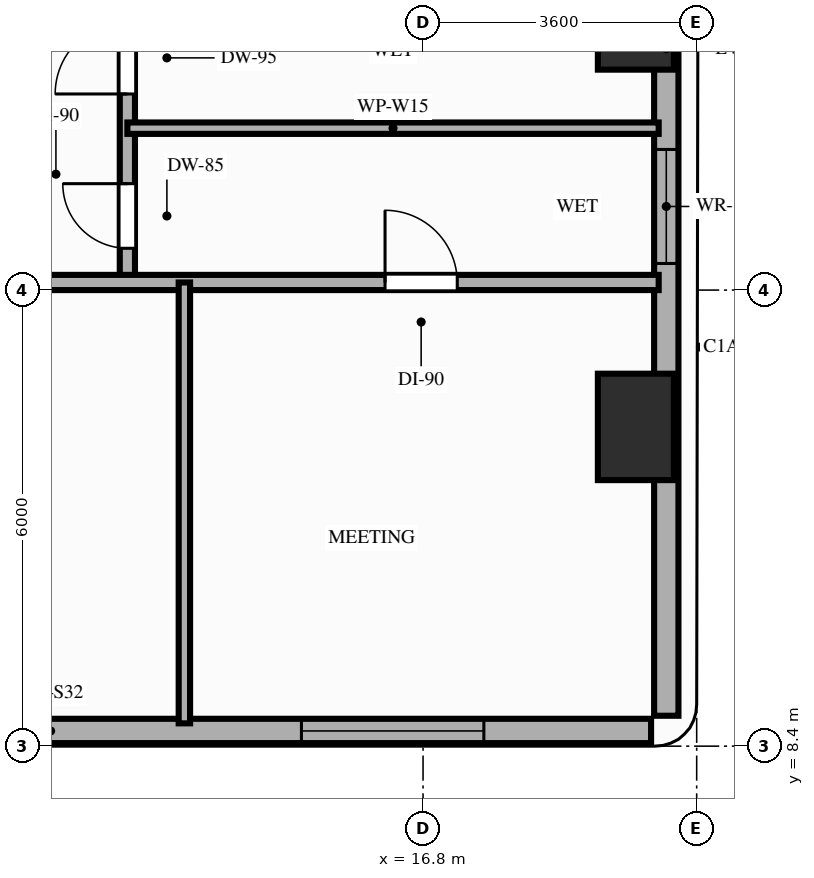
"""IFC4 building model, lengths in metres.
Left out: names, types, materials, properties, quantities, classifications, styles, units other than length and angle.
Written with IfcOpenShell. Run it as: python <this file> out.ifc"""

import sys

from ifc_helpers import new_model, si_unit, direction, frame, frame_2d, origin, origin_2d, place, context, subcontext, project, spatial, rectangle, extrude, element, fill, save


model = new_model("IFC4")
c1 = context("Model", 3, precision=1e-05, world=origin(), true_north=direction((0.0, 1.0)))
c2 = subcontext(c1, "Body", "Model", "MODEL_VIEW")
j1 = project(units=[si_unit("LENGTHUNIT", "METRE"), si_unit("PLANEANGLEUNIT", "RADIAN")], contexts=[c1])
p1 = place(None, origin())
s1 = spatial("IfcSite", under=j1, at=p1, CompositionType="ELEMENT")
p2 = place(p1, origin())
s2 = spatial("IfcBuilding", under=s1, at=p2, CompositionType="ELEMENT")
p3 = place(p2, frame((0.0, 0.0, 53.2)))
s3 = spatial("IfcBuildingStorey", under=s2, at=p3, CompositionType="ELEMENT", Elevation=53.2)
for number, where, z_axis, x_axis in (
    (1, (19.6, 12.6, 0.0), (0.0, 0.0, 1.0), (1.0, 0.0, 0.0)),
    (2, (19.6, 18.0, 0.0), (0.0, 0.0, 1.0), (1.0, 0.0, 0.0)),
):
    element("IfcColumn", number, at=place(p3, frame(where, z_axis=z_axis, x_axis=x_axis)), inside=s3, PredefinedType="COLUMN", context=c2, shape_type="SweptSolid", body=[
        extrude(rectangle(XDim=1.0, YDim=1.4, at=origin_2d()), origin(), (0.0, 0.0, 1.0), 3.2),
    ])
p4 = place(p3, frame((4.0, 8.6, 0.0), z_axis=(0.0, 0.0, 1.0), x_axis=(1.0, 0.0, 0.0)))
e3 = element("IfcWall", 3, at=p4, inside=s3, PredefinedType="STANDARD", context=c2, shape_type="SweptSolid", body=[
    extrude(rectangle(XDim=15.8, YDim=0.32, at=frame_2d((7.9, 0.0))), origin(), (0.0, 0.0, 1.0), 3.02),
])
p5 = place(p4, frame((11.2, 0.0, 0.85)))
e4 = element("IfcOpeningElement", 4, at=p5, cuts=e3, PredefinedType="OPENING", context=c2, shape_type="SweptSolid", body=[
    extrude(rectangle(XDim=2.4, YDim=1.8, at=frame_2d((1.2, 0.9))), frame((0.0, 0.17, 0.0), z_axis=(0.0, -1.0, 0.0), x_axis=(1.0, 0.0, 0.0)), (0.0, 0.0, 1.0), 0.34),
])
p6 = place(p3, frame((20.0, 8.8, 0.0), z_axis=(0.0, 0.0, 1.0), x_axis=(0.0, 1.0, 0.0)))
e5 = element("IfcWall", 5, at=p6, inside=s3, PredefinedType="STANDARD", context=c2, shape_type="SweptSolid", body=[
    extrude(rectangle(XDim=17.55, YDim=0.32, at=frame_2d((8.775, 0.0))), origin(), (0.0, 0.0, 1.0), 2.41),
])
p7 = place(p6, frame((5.95, 0.0, 0.85)))
e6 = element("IfcOpeningElement", 6, at=p7, cuts=e5, PredefinedType="OPENING", context=c2, shape_type="SweptSolid", body=[
    extrude(rectangle(XDim=1.5, YDim=1.31, at=frame_2d((0.75, 0.655))), frame((0.0, 0.17, 0.0), z_axis=(0.0, -1.0, 0.0), x_axis=(1.0, 0.0, 0.0)), (0.0, 0.0, 1.0), 0.34),
])
p8 = place(p6, frame((10.7, 0.0, 0.85)))
e7 = element("IfcOpeningElement", 7, at=p8, cuts=e5, PredefinedType="OPENING", context=c2, shape_type="SweptSolid", body=[
    extrude(rectangle(XDim=2.4, YDim=1.31, at=frame_2d((1.2, 0.655))), frame((0.0, 0.17, 0.0), z_axis=(0.0, -1.0, 0.0), x_axis=(1.0, 0.0, 0.0)), (0.0, 0.0, 1.0), 0.34),
])
p9 = place(p3, frame((12.91, 14.5, 0.0), z_axis=(0.0, 0.0, 1.0), x_axis=(0.0, 1.0, 0.0)))
e8 = element("IfcWall", 8, at=p9, inside=s3, PredefinedType="PARTITIONING", context=c2, shape_type="SweptSolid", body=[
    extrude(rectangle(XDim=13.6, YDim=0.2, at=frame_2d((6.8, 0.0))), origin(), (0.0, 0.0, 1.0), 2.41),
])
p10 = place(p9, frame((0.45, 0.0, 0.0)))
e9 = element("IfcOpeningElement", 9, at=p10, cuts=e8, PredefinedType="OPENING", context=c2, shape_type="SweptSolid", body=[
    extrude(rectangle(XDim=0.85, YDim=2.1, at=frame_2d((0.425, 1.05))), frame((0.0, 0.11, 0.0), z_axis=(0.0, -1.0, 0.0), x_axis=(1.0, 0.0, 0.0)), (0.0, 0.0, 1.0), 0.22),
])
p11 = place(p9, frame((2.48, 0.0, 0.0)))
e10 = element("IfcOpeningElement", 10, at=p11, cuts=e8, PredefinedType="OPENING", context=c2, shape_type="SweptSolid", body=[
    extrude(rectangle(XDim=0.95, YDim=2.1, at=frame_2d((0.475, 1.05))), frame((0.0, 0.11, 0.0), z_axis=(0.0, -1.0, 0.0), x_axis=(1.0, 0.0, 0.0)), (0.0, 0.0, 1.0), 0.22),
])
p12 = place(p9, frame((8.33, 0.0, 0.0)))
e11 = element("IfcOpeningElement", 11, at=p12, cuts=e8, PredefinedType="OPENING", context=c2, shape_type="SweptSolid", body=[
    extrude(rectangle(XDim=1.0, YDim=2.15, at=frame_2d((0.5, 1.075))), frame((0.0, 0.11, 0.0), z_axis=(0.0, -1.0, 0.0), x_axis=(1.0, 0.0, 0.0)), (0.0, 0.0, 1.0), 0.22),
])
p13 = place(p3, frame((3.9, 14.5, 0.0), z_axis=(0.0, 0.0, 1.0), x_axis=(1.0, 0.0, 0.0)))
e12 = element("IfcWall", 12, at=p13, inside=s3, PredefinedType="PARTITIONING", context=c2, shape_type="SweptSolid", body=[
    extrude(rectangle(XDim=16.0, YDim=0.2, at=frame_2d((8.0, 0.0))), origin(), (0.0, 0.0, 1.0), 2.41),
])
p14 = place(p13, frame((2.89, 0.0, 0.0)))
e13 = element("IfcOpeningElement", 13, at=p14, cuts=e12, PredefinedType="OPENING", context=c2, shape_type="SweptSolid", body=[
    extrude(rectangle(XDim=0.95, YDim=2.15, at=frame_2d((0.475, 1.075))), frame((0.0, 0.11, 0.0), z_axis=(0.0, -1.0, 0.0), x_axis=(1.0, 0.0, 0.0)), (0.0, 0.0, 1.0), 0.22),
])
p15 = place(p13, frame((6.24, 0.0, 0.0)))
e14 = element("IfcOpeningElement", 14, at=p15, cuts=e12, PredefinedType="OPENING", context=c2, shape_type="SweptSolid", body=[
    extrude(rectangle(XDim=0.95, YDim=2.15, at=frame_2d((0.475, 1.075))), frame((0.0, 0.11, 0.0), z_axis=(0.0, -1.0, 0.0), x_axis=(1.0, 0.0, 0.0)), (0.0, 0.0, 1.0), 0.22),
])
p16 = place(p13, frame((12.4, 0.0, 0.0)))
e15 = element("IfcOpeningElement", 15, at=p16, cuts=e12, PredefinedType="OPENING", context=c2, shape_type="SweptSolid", body=[
    extrude(rectangle(XDim=0.95, YDim=2.15, at=frame_2d((0.475, 1.075))), frame((0.0, 0.11, 0.0), z_axis=(0.0, -1.0, 0.0), x_axis=(1.0, 0.0, 0.0)), (0.0, 0.0, 1.0), 0.22),
])
p17 = place(p3, frame((13.66, 8.7, 0.0), z_axis=(0.0, 0.0, 1.0), x_axis=(0.0, 1.0, 0.0)))
e16 = element("IfcWall", 16, at=p17, inside=s3, PredefinedType="PARTITIONING", context=c2, shape_type="SweptSolid", body=[
    extrude(rectangle(XDim=5.8, YDim=0.15, at=frame_2d((2.9, 0.0))), origin(), (0.0, 0.0, 1.0), 2.41),
])
p18 = place(p3, frame((12.91, 16.53, 0.0), z_axis=(0.0, 0.0, 1.0), x_axis=(1.0, 0.0, 0.0)))
e17 = element("IfcWall", 17, at=p18, inside=s3, PredefinedType="PARTITIONING", context=c2, shape_type="SweptSolid", body=[
    extrude(rectangle(XDim=6.99, YDim=0.15, at=frame_2d((3.495, 0.0))), origin(), (0.0, 0.0, 1.0), 2.41),
])
p19 = place(p7, origin())
e18 = element("IfcWindow", 18, at=p19, inside=s3, PartitioningType="SINGLE_PANEL", PredefinedType="WINDOW", context=c2, shape_type="SweptSolid", body=[
    extrude(rectangle(XDim=1.5, YDim=1.31, at=frame_2d((0.75, 0.655))), frame((0.0, 0.03, 0.0), z_axis=(0.0, -1.0, 0.0), x_axis=(1.0, 0.0, 0.0)), (0.0, 0.0, 1.0), 0.06),
])
fill(e6, e18)
p20 = place(p5, origin())
e19 = element("IfcWindow", 19, at=p20, inside=s3, PartitioningType="SINGLE_PANEL", PredefinedType="WINDOW", context=c2, shape_type="SweptSolid", body=[
    extrude(rectangle(XDim=2.4, YDim=1.8, at=frame_2d((1.2, 0.9))), frame((0.0, 0.03, 0.0), z_axis=(0.0, -1.0, 0.0), x_axis=(1.0, 0.0, 0.0)), (0.0, 0.0, 1.0), 0.06),
])
fill(e4, e19)
p21 = place(p16, origin())
e20 = element("IfcDoor", 20, at=p21, inside=s3, OperationType="SINGLE_SWING_LEFT", PredefinedType="DOOR", context=c2, shape_type="SweptSolid", body=[
    extrude(rectangle(XDim=0.95, YDim=2.15, at=frame_2d((0.475, 1.075))), frame((0.0, 0.025, 0.0), z_axis=(0.0, -1.0, 0.0), x_axis=(1.0, 0.0, 0.0)), (0.0, 0.0, 1.0), 0.05),
])
fill(e15, e20)
p22 = place(p10, origin())
e21 = element("IfcDoor", 21, at=p22, inside=s3, OperationType="SINGLE_SWING_RIGHT", PredefinedType="DOOR", context=c2, shape_type="SweptSolid", body=[
    extrude(rectangle(XDim=0.85, YDim=2.1, at=frame_2d((0.425, 1.05))), frame((0.0, 0.025, 0.0), z_axis=(0.0, -1.0, 0.0), x_axis=(1.0, 0.0, 0.0)), (0.0, 0.0, 1.0), 0.05),
])
fill(e9, e21)
p23 = place(p11, origin())
e22 = element("IfcDoor", 22, at=p23, inside=s3, OperationType="SINGLE_SWING_LEFT", PredefinedType="DOOR", context=c2, shape_type="SweptSolid", body=[
    extrude(rectangle(XDim=0.95, YDim=2.1, at=frame_2d((0.475, 1.05))), frame((0.0, 0.025, 0.0), z_axis=(0.0, -1.0, 0.0), x_axis=(1.0, 0.0, 0.0)), (0.0, 0.0, 1.0), 0.05),
])
fill(e10, e22)
save(model, sys.argv[1])
